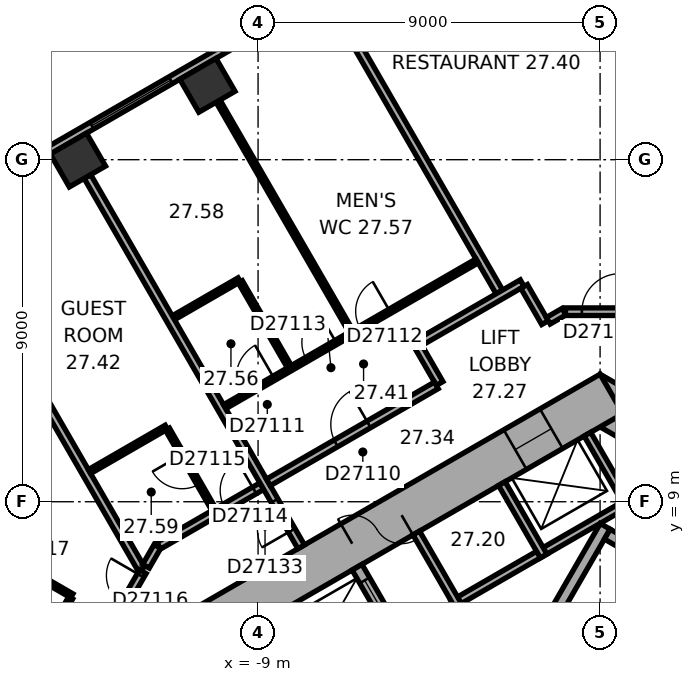
"""IFC4 building model, lengths in metres.
Left out: names, types, materials, properties, quantities, classifications, styles, units other than length and angle.
Written with IfcOpenShell. Run it as: python <this file> out.ifc"""

import sys

from ifc_helpers import new_model, si_unit, direction, frame, frame_2d, origin, origin_2d, place, context, subcontext, project, spatial, rectangle, extrude, element, fill, save


model = new_model("IFC4")
c1 = context("Model", 3, precision=1e-05, world=origin(), true_north=direction((0.0, 1.0)))
c2 = subcontext(c1, "Body", "Model", "MODEL_VIEW")
j1 = project(units=[si_unit("LENGTHUNIT", "METRE"), si_unit("PLANEANGLEUNIT", "RADIAN")], contexts=[c1])
p1 = place(None, origin())
s1 = spatial("IfcSite", under=j1, at=p1, CompositionType="ELEMENT")
p2 = place(p1, origin())
s2 = spatial("IfcBuilding", under=s1, at=p2, CompositionType="ELEMENT")
p3 = place(p2, frame((0.0, 0.0, 113.3)))
s3 = spatial("IfcBuildingStorey", under=s2, at=p3, CompositionType="ELEMENT", Elevation=113.3)
for number, where, z_axis, x_axis in (
    (1, (-10.333, 19.957, 0.0), (0.0, 0.0, 1.0), (-0.866, -0.5, 0.0)),
    (2, (-13.74, 17.99, 0.0), (0.0, 0.0, 1.0), (-0.866, -0.5, 0.0)),
):
    element("IfcColumn", number, at=place(p3, frame(where, z_axis=z_axis, x_axis=x_axis)), inside=s3, PredefinedType="COLUMN", context=c2, shape_type="SweptSolid", body=[
        extrude(rectangle(XDim=1.1, YDim=1.0, at=origin_2d()), origin(), (0.0, 0.0, 1.0), 3.3),
    ])
p4 = place(p3, frame((10.4, 5.658, 0.0), z_axis=(0.0, 0.0, 1.0), x_axis=(-0.866021384402, 0.500006961711, 0.0)))
e3 = element("IfcWall", 3, at=p4, inside=s3, PredefinedType="SHEAR", context=c2, shape_type="SweptSolid", body=[
    extrude(rectangle(XDim=12.355, YDim=1.2, at=frame_2d((6.178, 0.0))), origin(), (0.0, 0.0, 1.0), 3.3),
])
p5 = place(p4, frame((2.728, 0.0, 0.0)))
e4 = element("IfcOpeningElement", 4, at=p5, cuts=e3, PredefinedType="OPENING", context=c2, shape_type="SweptSolid", body=[
    extrude(rectangle(XDim=1.1, YDim=2.1, at=frame_2d((0.55, 1.05))), frame((0.0, 0.61, 0.0), z_axis=(0.0, -1.0, 0.0), x_axis=(1.0, 0.0, 0.0)), (0.0, 0.0, 1.0), 1.22),
])
p6 = place(p4, frame((5.328, 0.0, 0.0)))
e5 = element("IfcOpeningElement", 5, at=p6, cuts=e3, PredefinedType="OPENING", context=c2, shape_type="SweptSolid", body=[
    extrude(rectangle(XDim=1.1, YDim=2.1, at=frame_2d((0.55, 1.05))), frame((0.0, 0.61, 0.0), z_axis=(0.0, -1.0, 0.0), x_axis=(1.0, 0.0, 0.0)), (0.0, 0.0, 1.0), 1.22),
])
p7 = place(p4, frame((7.928, 0.0, 0.0)))
e6 = element("IfcOpeningElement", 6, at=p7, cuts=e3, PredefinedType="OPENING", context=c2, shape_type="SweptSolid", body=[
    extrude(rectangle(XDim=1.1, YDim=2.1, at=frame_2d((0.55, 1.05))), frame((0.0, 0.61, 0.0), z_axis=(0.0, -1.0, 0.0), x_axis=(1.0, 0.0, 0.0)), (0.0, 0.0, 1.0), 1.22),
])
p8 = place(p3, frame((0.3, 11.836, 0.0), z_axis=(0.0, 0.0, 1.0), x_axis=(-0.866021384402, -0.500006961711, 0.0)))
e7 = element("IfcWall", 7, at=p8, inside=s3, PredefinedType="SHEAR", context=c2, shape_type="SweptSolid", body=[
    extrude(rectangle(XDim=12.355, YDim=1.2, at=frame_2d((6.178, 0.0))), origin(), (0.0, 0.0, 1.0), 3.3),
])
p9 = place(p8, frame((6.378, 0.0, 0.0)))
e8 = element("IfcOpeningElement", 8, at=p9, cuts=e7, PredefinedType="OPENING", context=c2, shape_type="SweptSolid", body=[
    extrude(rectangle(XDim=1.5, YDim=2.1, at=frame_2d((0.75, 1.05))), frame((0.0, 0.61, 0.0), z_axis=(0.0, -1.0, 0.0), x_axis=(1.0, 0.0, 0.0)), (0.0, 0.0, 1.0), 1.22),
])
p10 = place(p8, frame((1.828, 0.0, 0.0)))
e9 = element("IfcOpeningElement", 9, at=p10, cuts=e7, PredefinedType="OPENING", context=c2, shape_type="SweptSolid", body=[
    extrude(rectangle(XDim=1.1, YDim=2.1, at=frame_2d((0.55, 1.05))), frame((0.0, 0.61, 0.0), z_axis=(0.0, -1.0, 0.0), x_axis=(1.0, 0.0, 0.0)), (0.0, 0.0, 1.0), 1.22),
])
p11 = place(p3, frame((-3.136, 24.805, 0.0), z_axis=(0.0, 0.0, 1.0), x_axis=(-0.866028291626, -0.499994998079, 0.0)))
e10 = element("IfcWall", 10, at=p11, inside=s3, PredefinedType="STANDARD", context=c2, shape_type="SweptSolid", body=[
    extrude(rectangle(XDim=21.246, YDim=0.2, at=frame_2d((10.623, 0.0))), origin(), (0.0, 0.0, 1.0), 3.3),
])
p12 = place(p11, frame((1.555, 0.0, 0.8)))
e11 = element("IfcOpeningElement", 11, at=p12, cuts=e10, PredefinedType="OPENING", context=c2, shape_type="SweptSolid", body=[
    extrude(rectangle(XDim=2.4, YDim=1.7, at=frame_2d((1.2, 0.85))), frame((0.0, 0.11, 0.0), z_axis=(0.0, -1.0, 0.0), x_axis=(1.0, 0.0, 0.0)), (0.0, 0.0, 1.0), 0.22),
])
p13 = place(p11, frame((5.489, 0.0, 0.8)))
e12 = element("IfcOpeningElement", 12, at=p13, cuts=e10, PredefinedType="OPENING", context=c2, shape_type="SweptSolid", body=[
    extrude(rectangle(XDim=2.4, YDim=1.7, at=frame_2d((1.2, 0.85))), frame((0.0, 0.11, 0.0), z_axis=(0.0, -1.0, 0.0), x_axis=(1.0, 0.0, 0.0)), (0.0, 0.0, 1.0), 0.22),
])
p14 = place(p11, frame((9.424, 0.0, 0.8)))
e13 = element("IfcOpeningElement", 13, at=p14, cuts=e10, PredefinedType="OPENING", context=c2, shape_type="SweptSolid", body=[
    extrude(rectangle(XDim=2.4, YDim=1.7, at=frame_2d((1.2, 0.85))), frame((0.0, 0.11, 0.0), z_axis=(0.0, -1.0, 0.0), x_axis=(1.0, 0.0, 0.0)), (0.0, 0.0, 1.0), 0.22),
])
p15 = place(p11, frame((13.358, 0.0, 0.8)))
e14 = element("IfcOpeningElement", 14, at=p15, cuts=e10, PredefinedType="OPENING", context=c2, shape_type="SweptSolid", body=[
    extrude(rectangle(XDim=2.4, YDim=1.7, at=frame_2d((1.2, 0.85))), frame((0.0, 0.11, 0.0), z_axis=(0.0, -1.0, 0.0), x_axis=(1.0, 0.0, 0.0)), (0.0, 0.0, 1.0), 0.22),
])
p16 = place(p11, frame((17.293, 0.0, 0.8)))
e15 = element("IfcOpeningElement", 15, at=p16, cuts=e10, PredefinedType="OPENING", context=c2, shape_type="SweptSolid", body=[
    extrude(rectangle(XDim=2.4, YDim=1.7, at=frame_2d((1.2, 0.85))), frame((0.0, 0.11, 0.0), z_axis=(0.0, -1.0, 0.0), x_axis=(1.0, 0.0, 0.0)), (0.0, 0.0, 1.0), 0.22),
])
p17 = place(p3, frame((0.803, 9.009, 0.0), z_axis=(0.0, 0.0, 1.0), x_axis=(-0.866028230842, -0.499995103361, 0.0)))
e16 = element("IfcWall", 16, at=p17, inside=s3, PredefinedType="PARTITIONING", context=c2, shape_type="SweptSolid", body=[
    extrude(rectangle(XDim=5.4, YDim=0.2, at=frame_2d((2.7, 0.0))), origin(), (0.0, 0.0, 1.0), 3.05),
])
p18 = place(p3, frame((0.767, 8.872, 0.0), z_axis=(0.0, 0.0, 1.0), x_axis=(-0.499994660107, 0.866028486751, 0.0)))
e17 = element("IfcWall", 17, at=p18, inside=s3, PredefinedType="PARTITIONING", context=c2, shape_type="SweptSolid", body=[
    extrude(rectangle(XDim=2.2, YDim=0.2, at=frame_2d((1.1, 0.0))), origin(), (0.0, 0.0, 1.0), 3.05),
])
for number, where, z_axis, x_axis in (
    (18, (-1.485, 7.572, 0.0), (0.0, 0.0, 1.0), (-0.5, 0.866, 0.0)),
    (19, (-3.737, 6.272, 0.0), (0.0, 0.0, 1.0), (-0.5, 0.866, 0.0)),
):
    element("IfcWall", number, at=place(p3, frame(where, z_axis=z_axis, x_axis=x_axis)), inside=s3, PredefinedType="PARTITIONING", context=c2, shape_type="SweptSolid", body=[
        extrude(rectangle(XDim=2.2, YDim=0.2, at=frame_2d((1.1, 0.0))), origin(), (0.0, 0.0, 1.0), 3.05),
    ])
p19 = place(p3, frame((-2.216, 4.282, 0.0), z_axis=(0.0, 0.0, 1.0), x_axis=(0.499977259774, 0.866038532462, 0.0)))
e20 = element("IfcWall", 20, at=p19, inside=s3, PredefinedType="SHEAR", context=c2, shape_type="SweptSolid", body=[
    extrude(rectangle(XDim=4.7, YDim=0.3, at=frame_2d((2.35, 0.0))), origin(), (0.0, 0.0, 1.0), 3.05),
])
p20 = place(p3, frame((6.303, 4.617, 0.0), z_axis=(0.0, 0.0, 1.0), x_axis=(-0.866027801685, 0.499995846692, 0.0)))
e21 = element("IfcWall", 21, at=p20, inside=s3, PredefinedType="SHEAR", context=c2, shape_type="SweptSolid", body=[
    extrude(rectangle(XDim=7.06, YDim=0.3, at=frame_2d((3.53, 0.0))), origin(), (0.0, 0.0, 1.0), 3.05),
])
p21 = place(p3, frame((-5.295, 5.372, 0.0), z_axis=(0.0, 0.0, 1.0), x_axis=(-0.500077893725, 0.86598042715, 0.0)))
e22 = element("IfcWall", 22, at=p21, inside=s3, PredefinedType="SHEAR", context=c2, shape_type="SweptSolid", body=[
    extrude(rectangle(XDim=2.2, YDim=0.3, at=frame_2d((1.1, 0.0))), origin(), (0.0, 0.0, 1.0), 3.05),
])
p22 = place(p21, frame((0.7, 0.0, 0.0)))
e23 = element("IfcOpeningElement", 23, at=p22, cuts=e22, PredefinedType="OPENING", context=c2, shape_type="SweptSolid", body=[
    extrude(rectangle(XDim=1.1, YDim=2.1, at=frame_2d((0.55, 1.05))), frame((0.0, 0.16, 0.0), z_axis=(0.0, -1.0, 0.0), x_axis=(1.0, 0.0, 0.0)), (0.0, 0.0, 1.0), 0.32),
])
p23 = place(p3, frame((-16.898, 15.59, 0.0), z_axis=(0.0, 0.0, 1.0), x_axis=(0.499994742786, -0.866028439017, 0.0)))
e24 = element("IfcWall", 24, at=p23, inside=s3, PredefinedType="PARTITIONING", context=c2, shape_type="SweptSolid", body=[
    extrude(rectangle(XDim=9.65, YDim=0.2, at=frame_2d((4.825, 0.0))), origin(), (0.0, 0.0, 1.0), 3.05),
])
p24 = place(p3, frame((-16.533, 8.044, 0.0), z_axis=(0.0, 0.0, 1.0), x_axis=(0.86601037836, -0.500026023896, 0.0)))
e25 = element("IfcWall", 25, at=p24, inside=s3, PredefinedType="PARTITIONING", context=c2, shape_type="SweptSolid", body=[
    extrude(rectangle(XDim=3.04, YDim=0.12, at=frame_2d((1.52, 0.0))), origin(), (0.0, 0.0, 1.0), 3.05),
])
p25 = place(p24, frame((1.07, 0.0, 0.0)))
e26 = element("IfcOpeningElement", 26, at=p25, cuts=e25, PredefinedType="OPENING", context=c2, shape_type="SweptSolid", body=[
    extrude(rectangle(XDim=0.9, YDim=2.1, at=frame_2d((0.45, 1.05))), frame((0.0, 0.07, 0.0), z_axis=(0.0, -1.0, 0.0), x_axis=(1.0, 0.0, 0.0)), (0.0, 0.0, 1.0), 0.14),
])
p26 = place(p3, frame((-13.931, 6.472, 0.0), z_axis=(0.0, 0.0, 1.0), x_axis=(-0.499739399214, -0.866175809448, 0.0)))
e27 = element("IfcWall", 27, at=p26, inside=s3, PredefinedType="PARTITIONING", context=c2, shape_type="SweptSolid", body=[
    extrude(rectangle(XDim=0.416, YDim=0.12, at=frame_2d((0.208, 0.0))), origin(), (0.0, 0.0, 1.0), 3.05),
])
p27 = place(p3, frame((-13.436, 9.794, 0.0), z_axis=(0.0, 0.0, 1.0), x_axis=(0.866053246676, 0.499951771596, 0.0)))
e28 = element("IfcWall", 28, at=p27, inside=s3, PredefinedType="PARTITIONING", context=c2, shape_type="SweptSolid", body=[
    extrude(rectangle(XDim=2.335, YDim=0.12, at=frame_2d((1.167, 0.0))), origin(), (0.0, 0.0, 1.0), 3.05),
])
p28 = place(p3, frame((-12.032, 7.162, 0.0), z_axis=(0.0, 0.0, 1.0), x_axis=(-0.499951829968, -0.866053212979, 0.0)))
e29 = element("IfcWall", 29, at=p28, inside=s3, PredefinedType="PARTITIONING", context=c2, shape_type="SweptSolid", body=[
    extrude(rectangle(XDim=1.136, YDim=0.2, at=frame_2d((0.568, 0.0))), origin(), (0.0, 0.0, 1.0), 3.05),
])
p29 = place(p28, frame((0.118, 0.0, 0.0)))
e30 = element("IfcOpeningElement", 30, at=p29, cuts=e29, PredefinedType="OPENING", context=c2, shape_type="SweptSolid", body=[
    extrude(rectangle(XDim=0.9, YDim=2.1, at=frame_2d((0.45, 1.05))), frame((0.0, 0.11, 0.0), z_axis=(0.0, -1.0, 0.0), x_axis=(1.0, 0.0, 0.0)), (0.0, 0.0, 1.0), 0.22),
])
p30 = place(p3, frame((-11.65, 7.823, 0.0), z_axis=(0.0, 0.0, 1.0), x_axis=(-0.50012165622, -0.865955154139, 0.0)))
e31 = element("IfcWall", 31, at=p30, inside=s3, PredefinedType="PARTITIONING", context=c2, shape_type="SweptSolid", body=[
    extrude(rectangle(XDim=0.6, YDim=0.2, at=frame_2d((0.3, 0.0))), origin(), (0.0, 0.0, 1.0), 3.05),
])
p31 = place(p3, frame((-11.385, 10.909, 0.0), z_axis=(0.0, 0.0, 1.0), x_axis=(0.500077547548, -0.865980627057, 0.0)))
e32 = element("IfcWall", 32, at=p31, inside=s3, PredefinedType="PARTITIONING", context=c2, shape_type="SweptSolid", body=[
    extrude(rectangle(XDim=2.44, YDim=0.12, at=frame_2d((1.22, 0.0))), origin(), (0.0, 0.0, 1.0), 3.05),
])
p32 = place(p31, frame((0.77, 0.0, 0.0)))
e33 = element("IfcOpeningElement", 33, at=p32, cuts=e32, PredefinedType="OPENING", context=c2, shape_type="SweptSolid", body=[
    extrude(rectangle(XDim=0.9, YDim=2.1, at=frame_2d((0.45, 1.05))), frame((0.0, 0.07, 0.0), z_axis=(0.0, -1.0, 0.0), x_axis=(1.0, 0.0, 0.0)), (0.0, 0.0, 1.0), 0.14),
])
p33 = place(p3, frame((-10.053, 19.542, 0.0), z_axis=(0.0, 0.0, 1.0), x_axis=(0.49998952364, -0.866031452229, 0.0)))
e34 = element("IfcWall", 34, at=p33, inside=s3, PredefinedType="PARTITIONING", context=c2, shape_type="SweptSolid", body=[
    extrude(rectangle(XDim=6.99, YDim=0.12, at=frame_2d((3.495, 0.0))), origin(), (0.0, 0.0, 1.0), 2.6),
])
p34 = place(p3, frame((-9.497, 14.84, 0.0), z_axis=(0.0, 0.0, 1.0), x_axis=(-0.866041268327, -0.499972520799, 0.0)))
e35 = element("IfcWall", 35, at=p34, inside=s3, PredefinedType="PARTITIONING", context=c2, shape_type="SweptSolid", body=[
    extrude(rectangle(XDim=2.0, YDim=0.12, at=frame_2d((1.0, 0.0))), origin(), (0.0, 0.0, 1.0), 3.05),
])
p35 = place(p3, frame((-8.902, 9.41, 0.0), z_axis=(0.0, 0.0, 1.0), x_axis=(-0.866014299198, -0.500019233215, 0.0)))
e36 = element("IfcWall", 36, at=p35, inside=s3, PredefinedType="PARTITIONING", context=c2, shape_type="SweptSolid", body=[
    extrude(rectangle(XDim=3.133, YDim=0.2, at=frame_2d((1.567, 0.0))), origin(), (0.0, 0.0, 1.0), 3.05),
])
p36 = place(p35, frame((0.225, 0.0, 0.0)))
e37 = element("IfcOpeningElement", 37, at=p36, cuts=e36, PredefinedType="OPENING", context=c2, shape_type="SweptSolid", body=[
    extrude(rectangle(XDim=0.9, YDim=2.1, at=frame_2d((0.45, 1.05))), frame((0.0, 0.11, 0.0), z_axis=(0.0, -1.0, 0.0), x_axis=(1.0, 0.0, 0.0)), (0.0, 0.0, 1.0), 0.22),
])
p37 = place(p3, frame((-8.177, 12.553, 0.0), z_axis=(0.0, 0.0, 1.0), x_axis=(-0.500006411147, 0.866021702275, 0.0)))
e38 = element("IfcWall", 38, at=p37, inside=s3, PredefinedType="PARTITIONING", context=c2, shape_type="SweptSolid", body=[
    extrude(rectangle(XDim=2.58, YDim=0.12, at=frame_2d((1.29, 0.0))), origin(), (0.0, 0.0, 1.0), 3.05),
])
p38 = place(p3, frame((-7.865, 7.814, 0.0), z_axis=(0.0, 0.0, 1.0), x_axis=(-0.500004234368, 0.866022959057, 0.0)))
e39 = element("IfcWall", 39, at=p38, inside=s3, PredefinedType="PARTITIONING", context=c2, shape_type="SweptSolid", body=[
    extrude(rectangle(XDim=11.25, YDim=0.2, at=frame_2d((5.625, 0.0))), origin(), (0.0, 0.0, 1.0), 3.05),
])
p39 = place(p38, frame((0.5, 0.0, 0.0)))
e40 = element("IfcOpeningElement", 40, at=p39, cuts=e39, PredefinedType="OPENING", context=c2, shape_type="SweptSolid", body=[
    extrude(rectangle(XDim=0.9, YDim=2.1, at=frame_2d((0.45, 1.05))), frame((0.0, 0.11, 0.0), z_axis=(0.0, -1.0, 0.0), x_axis=(1.0, 0.0, 0.0)), (0.0, 0.0, 1.0), 0.22),
])
p40 = place(p3, frame((-6.676, 21.492, 0.0), z_axis=(0.0, 0.0, 1.0), x_axis=(0.500011263043, -0.866018900966, 0.0)))
e41 = element("IfcWall", 41, at=p40, inside=s3, PredefinedType="PARTITIONING", context=c2, shape_type="SweptSolid", body=[
    extrude(rectangle(XDim=8.049, YDim=0.2, at=frame_2d((4.024, 0.0))), origin(), (0.0, 0.0, 1.0), 3.05),
])
p41 = place(p3, frame((-4.823, 13.152, 0.0), z_axis=(0.0, 0.0, 1.0), x_axis=(0.499986357472, -0.866033280158, 0.0)))
e42 = element("IfcWall", 42, at=p41, inside=s3, PredefinedType="PARTITIONING", context=c2, shape_type="SweptSolid", body=[
    extrude(rectangle(XDim=1.201, YDim=0.2, at=frame_2d((0.601, 0.0))), origin(), (0.0, 0.0, 1.0), 3.05),
])
p42 = place(p3, frame((-4.309, 12.061, 0.0), z_axis=(0.0, 0.0, 1.0), x_axis=(-0.866020679205, -0.500008183122, 0.0)))
e43 = element("IfcWall", 43, at=p42, inside=s3, PredefinedType="PARTITIONING", context=c2, shape_type="SweptSolid", body=[
    extrude(rectangle(XDim=5.104, YDim=0.2, at=frame_2d((2.552, 0.0))), origin(), (0.0, 0.0, 1.0), 3.05),
])
p43 = place(p42, frame((2.052, 0.0, 0.0)))
e44 = element("IfcOpeningElement", 44, at=p43, cuts=e43, PredefinedType="OPENING", context=c2, shape_type="SweptSolid", body=[
    extrude(rectangle(XDim=1.0, YDim=2.1, at=frame_2d((0.5, 1.05))), frame((0.0, 0.11, 0.0), z_axis=(0.0, -1.0, 0.0), x_axis=(1.0, 0.0, 0.0)), (0.0, 0.0, 1.0), 0.22),
])
p44 = place(p3, frame((-3.237, 15.336, 0.0), z_axis=(0.0, 0.0, 1.0), x_axis=(-0.866022840924, -0.500004438978, 0.0)))
e45 = element("IfcWall", 45, at=p44, inside=s3, PredefinedType="PARTITIONING", context=c2, shape_type="SweptSolid", body=[
    extrude(rectangle(XDim=7.669, YDim=0.12, at=frame_2d((3.835, 0.0))), origin(), (0.0, 0.0, 1.0), 3.05),
])
p45 = place(p44, frame((6.169, 0.0, 0.0)))
e46 = element("IfcOpeningElement", 46, at=p45, cuts=e45, PredefinedType="OPENING", context=c2, shape_type="SweptSolid", body=[
    extrude(rectangle(XDim=1.0, YDim=2.1, at=frame_2d((0.5, 1.05))), frame((0.0, 0.07, 0.0), z_axis=(0.0, -1.0, 0.0), x_axis=(1.0, 0.0, 0.0)), (0.0, 0.0, 1.0), 0.14),
])
p46 = place(p44, frame((2.65, 0.0, 0.0)))
e47 = element("IfcOpeningElement", 47, at=p46, cuts=e45, PredefinedType="OPENING", context=c2, shape_type="SweptSolid", body=[
    extrude(rectangle(XDim=0.9, YDim=2.1, at=frame_2d((0.45, 1.05))), frame((0.0, 0.07, 0.0), z_axis=(0.0, -1.0, 0.0), x_axis=(1.0, 0.0, 0.0)), (0.0, 0.0, 1.0), 0.14),
])
p47 = place(p44, frame((4.285, 0.0, 0.0)))
e48 = element("IfcOpeningElement", 48, at=p47, cuts=e45, PredefinedType="OPENING", context=c2, shape_type="SweptSolid", body=[
    extrude(rectangle(XDim=0.9, YDim=2.1, at=frame_2d((0.45, 1.05))), frame((0.0, 0.07, 0.0), z_axis=(0.0, -1.0, 0.0), x_axis=(1.0, 0.0, 0.0)), (0.0, 0.0, 1.0), 0.14),
])
p48 = place(p3, frame((-2.05, 14.752, 0.0), z_axis=(0.0, 0.0, 1.0), x_axis=(-0.866030936828, -0.499990416364, 0.0)))
e49 = element("IfcWall", 49, at=p48, inside=s3, PredefinedType="PARTITIONING", context=c2, shape_type="SweptSolid", body=[
    extrude(rectangle(XDim=3.102, YDim=0.2, at=frame_2d((1.551, 0.0))), origin(), (0.0, 0.0, 1.0), 3.05),
])
p49 = place(p3, frame((-1.449, 13.712, 0.0), z_axis=(0.0, 0.0, 1.0), x_axis=(-0.499978356969, 0.866037899034, 0.0)))
e50 = element("IfcWall", 50, at=p49, inside=s3, PredefinedType="PARTITIONING", context=c2, shape_type="SweptSolid", body=[
    extrude(rectangle(XDim=1.101, YDim=0.2, at=frame_2d((0.551, 0.0))), origin(), (0.0, 0.0, 1.0), 3.05),
])
p50 = place(p3, frame((-0.95, 14.001, 0.0), z_axis=(0.0, 0.0, 1.0), x_axis=(-0.86609177584, -0.499885022602, 0.0)))
e51 = element("IfcWall", 51, at=p50, inside=s3, PredefinedType="PARTITIONING", context=c2, shape_type="SweptSolid", body=[
    extrude(rectangle(XDim=0.477, YDim=0.2, at=frame_2d((0.238, 0.0))), origin(), (0.0, 0.0, 1.0), 3.05),
])
p51 = place(p3, frame((0.95, 14.001, 0.0), z_axis=(0.0, 0.0, 1.0), x_axis=(-1.0, 0.0, 0.0)))
e52 = element("IfcWall", 52, at=p51, inside=s3, PredefinedType="PARTITIONING", context=c2, shape_type="SweptSolid", body=[
    extrude(rectangle(XDim=1.86, YDim=0.2, at=frame_2d((0.93, 0.0))), origin(), (0.0, 0.0, 1.0), 3.05),
])
p52 = place(p51, frame((0.43, 0.0, 0.0)))
e53 = element("IfcOpeningElement", 53, at=p52, cuts=e52, PredefinedType="OPENING", context=c2, shape_type="SweptSolid", body=[
    extrude(rectangle(XDim=1.0, YDim=2.1, at=frame_2d((0.5, 1.05))), frame((0.0, 0.11, 0.0), z_axis=(0.0, -1.0, 0.0), x_axis=(1.0, 0.0, 0.0)), (0.0, 0.0, 1.0), 0.22),
])
p53 = place(p14, origin())
e54 = element("IfcWindow", 54, at=p53, inside=s3, PartitioningType="SINGLE_PANEL", PredefinedType="WINDOW", context=c2, shape_type="SweptSolid", body=[
    extrude(rectangle(XDim=2.4, YDim=1.7, at=frame_2d((1.2, 0.85))), frame((0.0, 0.03, 0.0), z_axis=(0.0, -1.0, 0.0), x_axis=(1.0, 0.0, 0.0)), (0.0, 0.0, 1.0), 0.06),
])
fill(e13, e54)
p54 = place(p9, origin())
e55 = element("IfcDoor", 55, at=p54, inside=s3, OperationType="DOUBLE_DOOR_SINGLE_SWING", PredefinedType="DOOR", context=c2, shape_type="SweptSolid", body=[
    extrude(rectangle(XDim=1.5, YDim=2.1, at=frame_2d((0.75, 1.05))), frame((0.0, 0.025, 0.0), z_axis=(0.0, -1.0, 0.0), x_axis=(1.0, 0.0, 0.0)), (0.0, 0.0, 1.0), 0.05),
])
fill(e8, e55)
p55 = place(p22, origin())
e56 = element("IfcDoor", 56, at=p55, inside=s3, OperationType="DOUBLE_DOOR_SLIDING", PredefinedType="DOOR", context=c2, shape_type="SweptSolid", body=[
    extrude(rectangle(XDim=1.1, YDim=2.1, at=frame_2d((0.55, 1.05))), frame((0.0, 0.025, 0.0), z_axis=(0.0, -1.0, 0.0), x_axis=(1.0, 0.0, 0.0)), (0.0, 0.0, 1.0), 0.05),
])
fill(e23, e56)
p56 = place(p10, origin())
e57 = element("IfcDoor", 57, at=p56, inside=s3, OperationType="DOUBLE_DOOR_SLIDING", PredefinedType="DOOR", context=c2, shape_type="SweptSolid", body=[
    extrude(rectangle(XDim=1.1, YDim=2.1, at=frame_2d((0.55, 1.05))), frame((0.0, 0.025, 0.0), z_axis=(0.0, -1.0, 0.0), x_axis=(1.0, 0.0, 0.0)), (0.0, 0.0, 1.0), 0.05),
])
fill(e9, e57)
p57 = place(p52, origin())
e58 = element("IfcDoor", 58, at=p57, inside=s3, OperationType="SINGLE_SWING_LEFT", PredefinedType="DOOR", context=c2, shape_type="SweptSolid", body=[
    extrude(rectangle(XDim=1.0, YDim=2.1, at=frame_2d((0.5, 1.05))), frame((0.0, 0.025, 0.0), z_axis=(0.0, -1.0, 0.0), x_axis=(1.0, 0.0, 0.0)), (0.0, 0.0, 1.0), 0.05),
])
fill(e53, e58)
p58 = place(p43, origin())
e59 = element("IfcDoor", 59, at=p58, inside=s3, OperationType="SINGLE_SWING_LEFT", PredefinedType="DOOR", context=c2, shape_type="SweptSolid", body=[
    extrude(rectangle(XDim=1.0, YDim=2.1, at=frame_2d((0.5, 1.05))), frame((0.0, 0.025, 0.0), z_axis=(0.0, -1.0, 0.0), x_axis=(1.0, 0.0, 0.0)), (0.0, 0.0, 1.0), 0.05),
])
fill(e44, e59)
p59 = place(p45, origin())
e60 = element("IfcDoor", 60, at=p59, inside=s3, OperationType="SINGLE_SWING_LEFT", PredefinedType="DOOR", context=c2, shape_type="SweptSolid", body=[
    extrude(rectangle(XDim=1.0, YDim=2.1, at=frame_2d((0.5, 1.05))), frame((0.0, 0.025, 0.0), z_axis=(0.0, -1.0, 0.0), x_axis=(1.0, 0.0, 0.0)), (0.0, 0.0, 1.0), 0.05),
])
fill(e46, e60)
p60 = place(p46, origin())
e61 = element("IfcDoor", 61, at=p60, inside=s3, OperationType="SINGLE_SWING_LEFT", PredefinedType="DOOR", context=c2, shape_type="SweptSolid", body=[
    extrude(rectangle(XDim=0.9, YDim=2.1, at=frame_2d((0.45, 1.05))), frame((0.0, 0.025, 0.0), z_axis=(0.0, -1.0, 0.0), x_axis=(1.0, 0.0, 0.0)), (0.0, 0.0, 1.0), 0.05),
])
fill(e47, e61)
p61 = place(p47, origin())
e62 = element("IfcDoor", 62, at=p61, inside=s3, OperationType="SINGLE_SWING_LEFT", PredefinedType="DOOR", context=c2, shape_type="SweptSolid", body=[
    extrude(rectangle(XDim=0.9, YDim=2.1, at=frame_2d((0.45, 1.05))), frame((0.0, 0.025, 0.0), z_axis=(0.0, -1.0, 0.0), x_axis=(1.0, 0.0, 0.0)), (0.0, 0.0, 1.0), 0.05),
])
fill(e48, e62)
p62 = place(p36, origin())
e63 = element("IfcDoor", 63, at=p62, inside=s3, OperationType="SINGLE_SWING_LEFT", PredefinedType="DOOR", context=c2, shape_type="SweptSolid", body=[
    extrude(rectangle(XDim=0.9, YDim=2.1, at=frame_2d((0.45, 1.05))), frame((0.0, 0.025, 0.0), z_axis=(0.0, -1.0, 0.0), x_axis=(1.0, 0.0, 0.0)), (0.0, 0.0, 1.0), 0.05),
])
fill(e37, e63)
p63 = place(p32, origin())
e64 = element("IfcDoor", 64, at=p63, inside=s3, OperationType="SINGLE_SWING_LEFT", PredefinedType="DOOR", context=c2, shape_type="SweptSolid", body=[
    extrude(rectangle(XDim=0.9, YDim=2.1, at=frame_2d((0.45, 1.05))), frame((0.0, 0.025, 0.0), z_axis=(0.0, -1.0, 0.0), x_axis=(1.0, 0.0, 0.0)), (0.0, 0.0, 1.0), 0.05),
])
fill(e33, e64)
p64 = place(p29, origin())
e65 = element("IfcDoor", 65, at=p64, inside=s3, OperationType="SINGLE_SWING_LEFT", PredefinedType="DOOR", context=c2, shape_type="SweptSolid", body=[
    extrude(rectangle(XDim=0.9, YDim=2.1, at=frame_2d((0.45, 1.05))), frame((0.0, 0.025, 0.0), z_axis=(0.0, -1.0, 0.0), x_axis=(1.0, 0.0, 0.0)), (0.0, 0.0, 1.0), 0.05),
])
fill(e30, e65)
p65 = place(p39, origin())
e66 = element("IfcDoor", 66, at=p65, inside=s3, OperationType="SINGLE_SWING_LEFT", PredefinedType="DOOR", context=c2, shape_type="SweptSolid", body=[
    extrude(rectangle(XDim=0.9, YDim=2.1, at=frame_2d((0.45, 1.05))), frame((0.0, 0.025, 0.0), z_axis=(0.0, -1.0, 0.0), x_axis=(1.0, 0.0, 0.0)), (0.0, 0.0, 1.0), 0.05),
])
fill(e40, e66)
save(model, sys.argv[1])
